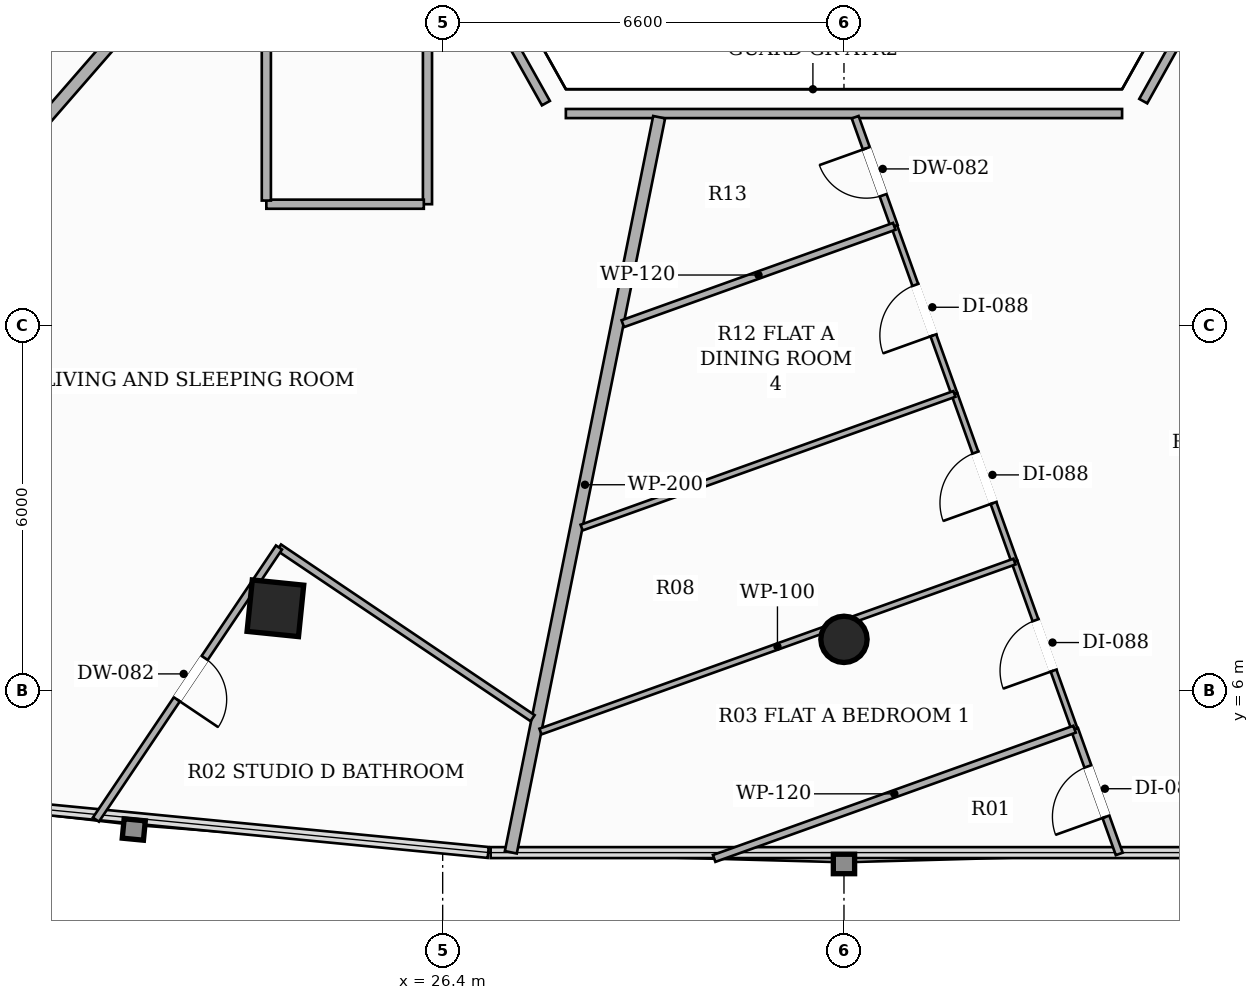
"""IFC4 building model, lengths in metres.
Left out: names, types, materials, properties, quantities, classifications, styles, units other than length and angle.
Written with IfcOpenShell. Run it as: python <this file> out.ifc"""

import sys

from ifc_helpers import new_model, si_unit, direction, frame, frame_2d, origin, origin_2d, place, context, subcontext, project, spatial, rectangle, hollow_rectangle, hollow_circle, extrude, element, fill, save


model = new_model("IFC4")
c1 = context("Model", 3, precision=1e-05, world=origin(), true_north=direction((0.0, 1.0)))
c2 = subcontext(c1, "Body", "Model", "MODEL_VIEW")
j1 = project(units=[si_unit("LENGTHUNIT", "METRE"), si_unit("PLANEANGLEUNIT", "RADIAN")], contexts=[c1])
p1 = place(None, origin())
s1 = spatial("IfcSite", under=j1, at=p1, CompositionType="ELEMENT")
p2 = place(p1, origin())
s2 = spatial("IfcBuilding", under=s1, at=p2, CompositionType="ELEMENT")
p3 = place(p2, frame((0.0, 0.0, 143.0)))
s3 = spatial("IfcBuildingStorey", under=s2, at=p3, CompositionType="ELEMENT", Elevation=143.0)
p4 = place(p3, frame((23.649, 7.355, 0.0), z_axis=(0.0, 0.0, 1.0), x_axis=(-0.994880708829, 0.101056297183, 0.0)))
e1 = element("IfcColumn", 1, at=p4, inside=s3, PredefinedType="COLUMN", context=c2, shape_type="SweptSolid", body=[
    extrude(hollow_rectangle(XDim=0.85, YDim=0.85, WallThickness=0.028, at=origin_2d()), origin(), (0.0, 0.0, 1.0), 3.3),
])
p5 = place(p3, frame((33.0, 6.844, 0.0), z_axis=(0.0, 0.0, 1.0), x_axis=(1.0, 0.0, 0.0)))
e2 = element("IfcColumn", 2, at=p5, inside=s3, PredefinedType="COLUMN", context=c2, shape_type="SweptSolid", body=[
    extrude(hollow_circle(Radius=0.381, WallThickness=0.022, at=origin_2d()), origin(), (0.0, 0.0, 1.0), 3.3),
])
p6 = place(p3, frame((26.15, 23.79, 0.0), z_axis=(0.0, 0.0, 1.0), x_axis=(0.0, -1.0, 0.0)))
e3 = element("IfcWall", 3, at=p6, inside=s3, PredefinedType="PARTITIONING", context=c2, shape_type="SweptSolid", body=[
    extrude(rectangle(XDim=9.79, YDim=0.15, at=frame_2d((4.895, 0.0))), origin(), (0.0, 0.0, 1.0), 2.681),
])
p7 = place(p6, frame((4.809, 0.0, 0.0)))
e4 = element("IfcOpeningElement", 4, at=p7, cuts=e3, PredefinedType="OPENING", context=c2, shape_type="SweptSolid", body=[
    extrude(rectangle(XDim=0.92, YDim=2.15, at=frame_2d((0.46, 1.075))), frame((0.0, 0.085, 0.0), z_axis=(0.0, -1.0, 0.0), x_axis=(1.0, 0.0, 0.0)), (0.0, 0.0, 1.0), 0.17),
])
p8 = place(p3, frame((26.09, 14.0, 0.0), z_axis=(0.0, 0.0, 1.0), x_axis=(-1.0, 0.0, 0.0)))
e5 = element("IfcWall", 5, at=p8, inside=s3, PredefinedType="PARTITIONING", context=c2, shape_type="SweptSolid", body=[
    extrude(rectangle(XDim=2.59, YDim=0.15, at=frame_2d((1.295, 0.0))), origin(), (0.0, 0.0, 1.0), 2.681),
])
p9 = place(p3, frame((23.5, 14.06, 0.0), z_axis=(0.0, 0.0, 1.0), x_axis=(0.0, 1.0, 0.0)))
e6 = element("IfcWall", 6, at=p9, inside=s3, PredefinedType="PARTITIONING", context=c2, shape_type="SweptSolid", body=[
    extrude(rectangle(XDim=22.84, YDim=0.15, at=frame_2d((11.42, 0.0))), origin(), (0.0, 0.0, 1.0), 2.373),
])
p10 = place(p9, frame((13.533, 0.0, 0.0)))
e7 = element("IfcOpeningElement", 7, at=p10, cuts=e6, PredefinedType="OPENING", context=c2, shape_type="SweptSolid", body=[
    extrude(rectangle(XDim=0.88, YDim=2.1, at=frame_2d((0.44, 1.05))), frame((0.0, 0.085, 0.0), z_axis=(0.0, -1.0, 0.0), x_axis=(1.0, 0.0, 0.0)), (0.0, 0.0, 1.0), 0.17),
])
p11 = place(p3, frame((38.408, 16.565, 0.0), z_axis=(0.0, 0.0, 1.0), x_axis=(-0.48761814532, -0.873057010942, 0.0)))
e8 = element("IfcWall", 8, at=p11, inside=s3, PredefinedType="PARTITIONING", context=c2, shape_type="SweptSolid", body=[
    extrude(rectangle(XDim=0.996, YDim=0.15, at=frame_2d((0.498, 0.0))), origin(), (0.0, 0.0, 1.0), 3.02),
])
p12 = place(p3, frame((37.574, 15.491, 0.0), z_axis=(0.0, 0.0, 1.0), x_axis=(-1.0, 0.0, 0.0)))
e9 = element("IfcWall", 9, at=p12, inside=s3, PredefinedType="PARTITIONING", context=c2, shape_type="SweptSolid", body=[
    extrude(rectangle(XDim=9.148, YDim=0.15, at=frame_2d((4.574, 0.0))), origin(), (0.0, 0.0, 1.0), 2.681),
])
p13 = place(p3, frame((28.098, 15.662, 0.0), z_axis=(0.0, 0.0, 1.0), x_axis=(-0.488804496818, 0.872393353878, 0.0)))
e10 = element("IfcWall", 10, at=p13, inside=s3, PredefinedType="PARTITIONING", context=c2, shape_type="SweptSolid", body=[
    extrude(rectangle(XDim=1.035, YDim=0.15, at=frame_2d((0.518, 0.0))), origin(), (0.0, 0.0, 1.0), 3.02),
])
p14 = place(p3, frame((27.521, 3.342, 0.0), z_axis=(0.0, 0.0, 1.0), x_axis=(0.197768112081, 0.980248832615, 0.0)))
e11 = element("IfcWall", 11, at=p14, inside=s3, PredefinedType="PARTITIONING", context=c2, shape_type="SweptSolid", body=[
    extrude(rectangle(XDim=12.333, YDim=0.2, at=frame_2d((6.166, 0.0))), origin(), (0.0, 0.0, 1.0), 2.373),
])
p15 = place(p3, frame((38.101, 23.79, 0.0), z_axis=(0.0, 0.0, 1.0), x_axis=(0.605201904092, -0.796072016393, 0.0)))
e12 = element("IfcWall", 12, at=p15, inside=s3, PredefinedType="PARTITIONING", context=c2, shape_type="SweptSolid", body=[
    extrude(rectangle(XDim=23.896, YDim=0.2, at=frame_2d((11.948, 0.0))), origin(), (0.0, 0.0, 1.0), 2.373),
])
p16 = place(p3, frame((23.44, 19.512, 0.0), z_axis=(0.0, 0.0, 1.0), x_axis=(-0.656359216658, -0.754448526215, 0.0)))
e13 = element("IfcWall", 13, at=p16, inside=s3, PredefinedType="PARTITIONING", context=c2, shape_type="SweptSolid", body=[
    extrude(rectangle(XDim=19.085, YDim=0.2, at=frame_2d((9.543, 0.0))), origin(), (0.0, 0.0, 1.0), 2.373),
])
p17 = place(p3, frame((33.827, 13.636, 0.0), z_axis=(0.0, 0.0, 1.0), x_axis=(-0.337163686904, 0.941446041063, 0.0)))
e14 = element("IfcWall", 14, at=p17, inside=s3, PredefinedType="PARTITIONING", context=c2, shape_type="SweptSolid", body=[
    extrude(rectangle(XDim=1.906, YDim=0.12, at=frame_2d((0.953, 0.0))), origin(), (0.0, 0.0, 1.0), 2.681),
])
p18 = place(p17, frame((0.543, 0.0, 0.0)))
e15 = element("IfcOpeningElement", 15, at=p18, cuts=e14, PredefinedType="OPENING", context=c2, shape_type="SweptSolid", body=[
    extrude(rectangle(XDim=0.82, YDim=2.1, at=frame_2d((0.41, 1.05))), frame((0.0, 0.07, 0.0), z_axis=(0.0, -1.0, 0.0), x_axis=(1.0, 0.0, 0.0)), (0.0, 0.0, 1.0), 0.14),
])
p19 = place(p3, frame((37.527, 3.315, 0.0), z_axis=(0.0, 0.0, 1.0), x_axis=(-0.337393850622, 0.9413635799, 0.0)))
e16 = element("IfcWall", 16, at=p19, inside=s3, PredefinedType="PARTITIONING", context=c2, shape_type="SweptSolid", body=[
    extrude(rectangle(XDim=2.179, YDim=0.12, at=frame_2d((1.089, 0.0))), origin(), (0.0, 0.0, 1.0), 3.02),
])
p20 = place(p19, frame((0.649, 0.0, 0.0)))
e17 = element("IfcOpeningElement", 17, at=p20, cuts=e16, PredefinedType="OPENING", context=c2, shape_type="SweptSolid", body=[
    extrude(rectangle(XDim=0.88, YDim=2.1, at=frame_2d((0.44, 1.05))), frame((0.0, 0.07, 0.0), z_axis=(0.0, -1.0, 0.0), x_axis=(1.0, 0.0, 0.0)), (0.0, 0.0, 1.0), 0.14),
])
p21 = place(p3, frame((36.792, 5.366, 0.0), z_axis=(0.0, 0.0, 1.0), x_axis=(-0.33735537207, 0.941377370099, 0.0)))
e18 = element("IfcWall", 18, at=p21, inside=s3, PredefinedType="PARTITIONING", context=c2, shape_type="SweptSolid", body=[
    extrude(rectangle(XDim=2.929, YDim=0.1, at=frame_2d((1.464, 0.0))), origin(), (0.0, 0.0, 1.0), 2.373),
])
p22 = place(p21, frame((1.024, 0.0, 0.0)))
e19 = element("IfcOpeningElement", 19, at=p22, cuts=e18, PredefinedType="OPENING", context=c2, shape_type="SweptSolid", body=[
    extrude(rectangle(XDim=0.88, YDim=2.1, at=frame_2d((0.44, 1.05))), frame((0.0, 0.06, 0.0), z_axis=(0.0, -1.0, 0.0), x_axis=(1.0, 0.0, 0.0)), (0.0, 0.0, 1.0), 0.12),
])
p23 = place(p3, frame((35.804, 8.123, 0.0), z_axis=(0.0, 0.0, 1.0), x_axis=(-0.337381847176, 0.941367881965, 0.0)))
e20 = element("IfcWall", 20, at=p23, inside=s3, PredefinedType="PARTITIONING", context=c2, shape_type="SweptSolid", body=[
    extrude(rectangle(XDim=2.928, YDim=0.1, at=frame_2d((1.464, 0.0))), origin(), (0.0, 0.0, 1.0), 3.02),
])
p24 = place(p23, frame((1.024, 0.0, 0.0)))
e21 = element("IfcOpeningElement", 21, at=p24, cuts=e20, PredefinedType="OPENING", context=c2, shape_type="SweptSolid", body=[
    extrude(rectangle(XDim=0.88, YDim=2.1, at=frame_2d((0.44, 1.05))), frame((0.0, 0.06, 0.0), z_axis=(0.0, -1.0, 0.0), x_axis=(1.0, 0.0, 0.0)), (0.0, 0.0, 1.0), 0.12),
])
p25 = place(p3, frame((34.816, 10.88, 0.0), z_axis=(0.0, 0.0, 1.0), x_axis=(-0.337756804272, 0.941233414817, 0.0)))
e22 = element("IfcWall", 22, at=p25, inside=s3, PredefinedType="PARTITIONING", context=c2, shape_type="SweptSolid", body=[
    extrude(rectangle(XDim=2.928, YDim=0.1, at=frame_2d((1.464, 0.0))), origin(), (0.0, 0.0, 1.0), 3.02),
])
p26 = place(p25, frame((1.024, 0.0, 0.0)))
e23 = element("IfcOpeningElement", 23, at=p26, cuts=e22, PredefinedType="OPENING", context=c2, shape_type="SweptSolid", body=[
    extrude(rectangle(XDim=0.88, YDim=2.1, at=frame_2d((0.44, 1.05))), frame((0.0, 0.06, 0.0), z_axis=(0.0, -1.0, 0.0), x_axis=(1.0, 0.0, 0.0)), (0.0, 0.0, 1.0), 0.12),
])
p27 = place(p3, frame((33.827, 13.636, 0.0), z_axis=(0.0, 0.0, 1.0), x_axis=(-0.941307932725, -0.337549071676, 0.0)))
e24 = element("IfcWall", 24, at=p27, inside=s3, PredefinedType="PARTITIONING", context=c2, shape_type="SweptSolid", body=[
    extrude(rectangle(XDim=4.743, YDim=0.12, at=frame_2d((2.372, 0.0))), origin(), (0.0, 0.0, 1.0), 2.681),
])
p28 = place(p3, frame((30.865, 3.241, 0.0), z_axis=(0.0, 0.0, 1.0), x_axis=(0.941328015911, 0.337493061354, 0.0)))
e25 = element("IfcWall", 25, at=p28, inside=s3, PredefinedType="PARTITIONING", context=c2, shape_type="SweptSolid", body=[
    extrude(rectangle(XDim=6.296, YDim=0.12, at=frame_2d((3.148, 0.0))), origin(), (0.0, 0.0, 1.0), 2.579),
])
p29 = place(p3, frame((28.008, 5.328, 0.0), z_axis=(0.0, 0.0, 1.0), x_axis=(0.941323677897, 0.337505160599, 0.0)))
e26 = element("IfcWall", 26, at=p29, inside=s3, PredefinedType="PARTITIONING", context=c2, shape_type="SweptSolid", body=[
    extrude(rectangle(XDim=8.282, YDim=0.1, at=frame_2d((4.141, 0.0))), origin(), (0.0, 0.0, 1.0), 2.373),
])
p30 = place(p3, frame((28.685, 8.682, 0.0), z_axis=(0.0, 0.0, 1.0), x_axis=(0.94133243901, 0.337480724291, 0.0)))
e27 = element("IfcWall", 27, at=p30, inside=s3, PredefinedType="PARTITIONING", context=c2, shape_type="SweptSolid", body=[
    extrude(rectangle(XDim=6.513, YDim=0.1, at=frame_2d((3.256, 0.0))), origin(), (0.0, 0.0, 1.0), 2.681),
])
p31 = place(p3, frame((27.879, 5.548, 0.0), z_axis=(0.0, 0.0, 1.0), x_axis=(-0.829629274352, 0.558314666777, 0.0)))
e28 = element("IfcWall", 28, at=p31, inside=s3, PredefinedType="PARTITIONING", context=c2, shape_type="SweptSolid", body=[
    extrude(rectangle(XDim=5.027, YDim=0.12, at=frame_2d((2.514, 0.0))), origin(), (0.0, 0.0, 1.0), 2.373),
])
p32 = place(p3, frame((23.708, 8.355, 0.0), z_axis=(0.0, 0.0, 1.0), x_axis=(-0.55815233332, -0.829738496642, 0.0)))
e29 = element("IfcWall", 29, at=p32, inside=s3, PredefinedType="PARTITIONING", context=c2, shape_type="SweptSolid", body=[
    extrude(rectangle(XDim=5.395, YDim=0.12, at=frame_2d((2.697, 0.0))), origin(), (0.0, 0.0, 1.0), 2.373),
])
p33 = place(p32, frame((2.19, 0.0, 0.0)))
e30 = element("IfcOpeningElement", 30, at=p33, cuts=e29, PredefinedType="OPENING", context=c2, shape_type="SweptSolid", body=[
    extrude(rectangle(XDim=0.82, YDim=2.1, at=frame_2d((0.41, 1.05))), frame((0.0, 0.07, 0.0), z_axis=(0.0, -1.0, 0.0), x_axis=(1.0, 0.0, 0.0)), (0.0, 0.0, 1.0), 0.14),
])
p34 = place(p18, origin())
e31 = element("IfcDoor", 31, at=p34, inside=s3, OperationType="SINGLE_SWING_RIGHT", PredefinedType="DOOR", context=c2, shape_type="SweptSolid", body=[
    extrude(rectangle(XDim=0.82, YDim=2.1, at=frame_2d((0.41, 1.05))), frame((0.0, 0.025, 0.0), z_axis=(0.0, -1.0, 0.0), x_axis=(1.0, 0.0, 0.0)), (0.0, 0.0, 1.0), 0.05),
])
fill(e15, e31)
p35 = place(p20, origin())
e32 = element("IfcDoor", 32, at=p35, inside=s3, OperationType="SINGLE_SWING_LEFT", PredefinedType="DOOR", context=c2, shape_type="SweptSolid", body=[
    extrude(rectangle(XDim=0.88, YDim=2.1, at=frame_2d((0.44, 1.05))), frame((0.0, 0.025, 0.0), z_axis=(0.0, -1.0, 0.0), x_axis=(1.0, 0.0, 0.0)), (0.0, 0.0, 1.0), 0.05),
])
fill(e17, e32)
p36 = place(p22, origin())
e33 = element("IfcDoor", 33, at=p36, inside=s3, OperationType="SINGLE_SWING_LEFT", PredefinedType="DOOR", context=c2, shape_type="SweptSolid", body=[
    extrude(rectangle(XDim=0.88, YDim=2.1, at=frame_2d((0.44, 1.05))), frame((0.0, 0.025, 0.0), z_axis=(0.0, -1.0, 0.0), x_axis=(1.0, 0.0, 0.0)), (0.0, 0.0, 1.0), 0.05),
])
fill(e19, e33)
p37 = place(p24, origin())
e34 = element("IfcDoor", 34, at=p37, inside=s3, OperationType="SINGLE_SWING_LEFT", PredefinedType="DOOR", context=c2, shape_type="SweptSolid", body=[
    extrude(rectangle(XDim=0.88, YDim=2.1, at=frame_2d((0.44, 1.05))), frame((0.0, 0.025, 0.0), z_axis=(0.0, -1.0, 0.0), x_axis=(1.0, 0.0, 0.0)), (0.0, 0.0, 1.0), 0.05),
])
fill(e21, e34)
p38 = place(p26, origin())
e35 = element("IfcDoor", 35, at=p38, inside=s3, OperationType="SINGLE_SWING_LEFT", PredefinedType="DOOR", context=c2, shape_type="SweptSolid", body=[
    extrude(rectangle(XDim=0.88, YDim=2.1, at=frame_2d((0.44, 1.05))), frame((0.0, 0.025, 0.0), z_axis=(0.0, -1.0, 0.0), x_axis=(1.0, 0.0, 0.0)), (0.0, 0.0, 1.0), 0.05),
])
fill(e23, e35)
p39 = place(p33, origin())
e36 = element("IfcDoor", 36, at=p39, inside=s3, OperationType="SINGLE_SWING_RIGHT", PredefinedType="DOOR", context=c2, shape_type="SweptSolid", body=[
    extrude(rectangle(XDim=0.82, YDim=2.1, at=frame_2d((0.41, 1.05))), frame((0.0, 0.025, 0.0), z_axis=(0.0, -1.0, 0.0), x_axis=(1.0, 0.0, 0.0)), (0.0, 0.0, 1.0), 0.05),
])
fill(e30, e36)
save(model, sys.argv[1])
